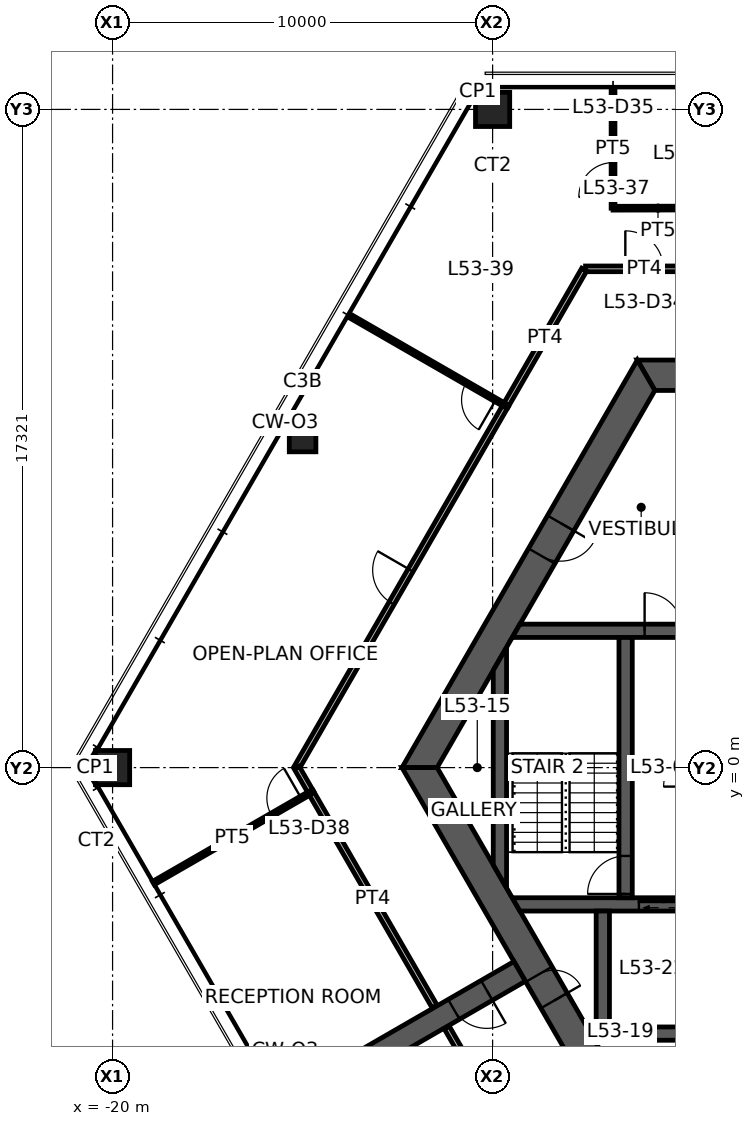
"""IFC4 building model, lengths in metres.
Left out: names, types, materials, properties, quantities, classifications, styles, units other than length and angle.
Written with IfcOpenShell. Run it as: python <this file> out.ifc"""

import sys

from ifc_helpers import new_model, si_unit, direction, frame, frame_2d, origin, origin_2d, place, context, subcontext, project, spatial, polyline, rectangle, hollow_rectangle, outline, extrude, element, fill, save


model = new_model("IFC4")
c1 = context("Model", 3, precision=1e-05, world=origin(), true_north=direction((0.0, 1.0)))
c2 = subcontext(c1, "Body", "Model", "MODEL_VIEW")
j1 = project(units=[si_unit("LENGTHUNIT", "METRE"), si_unit("PLANEANGLEUNIT", "RADIAN")], contexts=[c1])
p1 = place(None, origin())
s1 = spatial("IfcSite", under=j1, at=p1, CompositionType="ELEMENT")
p2 = place(p1, origin())
s2 = spatial("IfcBuilding", under=s1, at=p2, CompositionType="ELEMENT")
p3 = place(p2, frame((0.0, 0.0, 212.8)))
s3 = spatial("IfcBuildingStorey", under=s2, at=p3, CompositionType="ELEMENT", Elevation=212.8)
for number, where, z_axis, x_axis in (
    (1, (-10.0, 17.321, 0.0), (0.0, 0.0, 1.0), (1.0, 0.0, 0.0)),
    (2, (-20.0, 0.0, 0.0), (0.0, 0.0, 1.0), (1.0, 0.0, 0.0)),
):
    element("IfcColumn", number, at=place(p3, frame(where, z_axis=z_axis, x_axis=x_axis)), inside=s3, PredefinedType="COLUMN", context=c2, shape_type="SweptSolid", body=[
        extrude(hollow_rectangle(XDim=0.9, YDim=0.9, WallThickness=0.09, at=origin_2d()), origin(), (0.0, 0.0, 1.0), 3.9),
    ])
p4 = place(p3, frame((-15.0, 8.66, 0.0), z_axis=(0.0, 0.0, 1.0), x_axis=(1.0, 0.0, 0.0)))
e3 = element("IfcColumn", 3, at=p4, inside=s3, PredefinedType="COLUMN", context=c2, shape_type="SweptSolid", body=[
    extrude(hollow_rectangle(XDim=0.7, YDim=0.7, WallThickness=0.036, at=origin_2d()), origin(), (0.0, 0.0, 1.0), 3.9),
])
p5 = place(p3, frame((5.961, 10.325, 0.0), z_axis=(0.0, 0.0, 1.0), x_axis=(-1.0, 0.0, 0.0)))
e4 = element("IfcWall", 4, at=p5, inside=s3, PredefinedType="SHEAR", context=c2, shape_type="SweptSolid", body=[
    extrude(outline(polyline([(-0.231, -0.4), (4.649, -0.4), (5.549, -0.4), (6.374, -0.4), (7.273, -0.4), (12.153, -0.4), (11.691, 0.4), (7.273, 0.4), (6.374, 0.4), (5.549, 0.4), (4.649, 0.4), (0.231, 0.4), (-0.231, -0.4)])), origin(), (0.0, 0.0, 1.0), 3.9),
])
p6 = place(p5, frame((6.374, 0.0, 0.0)))
e5 = element("IfcOpeningElement", 5, at=p6, cuts=e4, PredefinedType="OPENING", context=c2, shape_type="SweptSolid", body=[
    extrude(rectangle(XDim=0.9, YDim=2.1, at=frame_2d((0.45, 1.05))), frame((0.0, 0.41, 0.0), z_axis=(0.0, -1.0, 0.0), x_axis=(1.0, 0.0, 0.0)), (0.0, 0.0, 1.0), 0.82),
])
p7 = place(p5, frame((4.649, 0.0, 0.0)))
e6 = element("IfcOpeningElement", 6, at=p7, cuts=e4, PredefinedType="OPENING", context=c2, shape_type="SweptSolid", body=[
    extrude(rectangle(XDim=0.9, YDim=2.1, at=frame_2d((0.45, 1.05))), frame((0.0, 0.41, 0.0), z_axis=(0.0, -1.0, 0.0), x_axis=(1.0, 0.0, 0.0)), (0.0, 0.0, 1.0), 0.82),
])
p8 = place(p3, frame((-5.961, 10.325, 0.0), z_axis=(0.0, 0.0, 1.0), x_axis=(-0.500004296715, -0.866022923061, 0.0)))
e7 = element("IfcWall", 7, at=p8, inside=s3, PredefinedType="SHEAR", context=c2, shape_type="SweptSolid", body=[
    extrude(outline(polyline([(-0.231, -0.4), (4.494, -0.4), (5.494, -0.4), (12.153, -0.4), (11.691, 0.4), (5.494, 0.4), (4.494, 0.4), (0.231, 0.4), (-0.231, -0.4)])), origin(), (0.0, 0.0, 1.0), 3.9),
])
p9 = place(p8, frame((4.494, 0.0, 0.0)))
e8 = element("IfcOpeningElement", 8, at=p9, cuts=e7, PredefinedType="OPENING", context=c2, shape_type="SweptSolid", body=[
    extrude(rectangle(XDim=1.0, YDim=2.1, at=frame_2d((0.5, 1.05))), frame((0.0, 0.41, 0.0), z_axis=(0.0, -1.0, 0.0), x_axis=(1.0, 0.0, 0.0)), (0.0, 0.0, 1.0), 0.82),
])
p10 = place(p3, frame((-11.922, 0.0, 0.0), z_axis=(0.0, 0.0, 1.0), x_axis=(0.500004296715, -0.866022923061, 0.0)))
e9 = element("IfcWall", 9, at=p10, inside=s3, PredefinedType="SHEAR", context=c2, shape_type="SweptSolid", body=[
    extrude(outline(polyline([(-0.231, -0.4), (6.281, -0.4), (7.081, -0.4), (12.153, -0.4), (11.691, 0.4), (7.081, 0.4), (6.281, 0.4), (0.231, 0.4), (-0.231, -0.4)])), origin(), (0.0, 0.0, 1.0), 3.9),
])
p11 = place(p10, frame((6.281, 0.0, 0.0)))
e10 = element("IfcOpeningElement", 10, at=p11, cuts=e9, PredefinedType="OPENING", context=c2, shape_type="SweptSolid", body=[
    extrude(rectangle(XDim=0.8, YDim=2.1, at=frame_2d((0.4, 1.05))), frame((0.0, 0.41, 0.0), z_axis=(0.0, -1.0, 0.0), x_axis=(1.0, 0.0, 0.0)), (0.0, 0.0, 1.0), 0.82),
])
p12 = place(p3, frame((-9.288, -5.363, 0.0), z_axis=(0.0, 0.0, 1.0), x_axis=(-0.866027473358, -0.499996415376, 0.0)))
e11 = element("IfcWall", 11, at=p12, inside=s3, PredefinedType="SHEAR", context=c2, shape_type="SweptSolid", body=[
    extrude(rectangle(XDim=7.045, YDim=0.6, at=frame_2d((3.523, 0.0))), origin(), (0.0, 0.0, 1.0), 3.9),
])
p13 = place(p12, frame((1.0, 0.0, 0.0)))
e12 = element("IfcOpeningElement", 12, at=p13, cuts=e11, PredefinedType="OPENING", context=c2, shape_type="SweptSolid", body=[
    extrude(rectangle(XDim=1.0, YDim=2.1, at=frame_2d((0.5, 1.05))), frame((0.0, 0.31, 0.0), z_axis=(0.0, -1.0, 0.0), x_axis=(1.0, 0.0, 0.0)), (0.0, 0.0, 1.0), 0.62),
])
p14 = place(p3, frame((-9.382, 3.6, 0.0), z_axis=(0.0, 0.0, 1.0), x_axis=(1.0, 0.0, 0.0)))
e13 = element("IfcWall", 13, at=p14, inside=s3, PredefinedType="SHEAR", context=c2, shape_type="SweptSolid", body=[
    extrude(outline(polyline([(-0.101, -0.175), (3.382, -0.175), (4.382, -0.175), (5.782, -0.175), (6.882, -0.175), (7.957, -0.175), (7.957, 0.175), (6.882, 0.175), (5.782, 0.175), (4.382, 0.175), (3.382, 0.175), (0.101, 0.175), (-0.101, -0.175)])), origin(), (0.0, 0.0, 1.0), 3.9),
])
p15 = place(p14, frame((3.382, 0.0, 0.0)))
e14 = element("IfcOpeningElement", 14, at=p15, cuts=e13, PredefinedType="OPENING", context=c2, shape_type="SweptSolid", body=[
    extrude(rectangle(XDim=1.0, YDim=2.1, at=frame_2d((0.5, 1.05))), frame((0.0, 0.185, 0.0), z_axis=(0.0, -1.0, 0.0), x_axis=(1.0, 0.0, 0.0)), (0.0, 0.0, 1.0), 0.37),
])
p16 = place(p14, frame((5.782, 0.0, 0.0)))
e15 = element("IfcOpeningElement", 15, at=p16, cuts=e13, PredefinedType="OPENING", context=c2, shape_type="SweptSolid", body=[
    extrude(rectangle(XDim=1.1, YDim=2.1, at=frame_2d((0.55, 1.05))), frame((0.0, 0.185, 0.0), z_axis=(0.0, -1.0, 0.0), x_axis=(1.0, 0.0, 0.0)), (0.0, 0.0, 1.0), 0.37),
])
p17 = place(p3, frame((-9.382, -3.6, 0.0), z_axis=(0.0, 0.0, 1.0), x_axis=(1.0, 0.0, 0.0)))
e16 = element("IfcWall", 16, at=p17, inside=s3, PredefinedType="SHEAR", context=c2, shape_type="SweptSolid", body=[
    extrude(outline(polyline([(0.101, -0.175), (3.232, -0.175), (4.532, -0.175), (5.782, -0.175), (6.882, -0.175), (7.957, -0.175), (7.957, 0.175), (6.882, 0.175), (5.782, 0.175), (4.532, 0.175), (3.232, 0.175), (-0.101, 0.175), (0.101, -0.175)])), origin(), (0.0, 0.0, 1.0), 3.9),
])
p18 = place(p17, frame((5.782, 0.0, 0.0)))
e17 = element("IfcOpeningElement", 17, at=p18, cuts=e16, PredefinedType="OPENING", context=c2, shape_type="SweptSolid", body=[
    extrude(rectangle(XDim=1.1, YDim=2.1, at=frame_2d((0.55, 1.05))), frame((0.0, 0.185, 0.0), z_axis=(0.0, -1.0, 0.0), x_axis=(1.0, 0.0, 0.0)), (0.0, 0.0, 1.0), 0.37),
])
p19 = place(p17, frame((3.232, 0.0, 0.0)))
e18 = element("IfcOpeningElement", 18, at=p19, cuts=e16, PredefinedType="OPENING", context=c2, shape_type="SweptSolid", body=[
    extrude(rectangle(XDim=1.3, YDim=2.1, at=frame_2d((0.65, 1.05))), frame((0.0, 0.185, 0.0), z_axis=(0.0, -1.0, 0.0), x_axis=(1.0, 0.0, 0.0)), (0.0, 0.0, 1.0), 0.37),
])
p20 = place(p3, frame((-6.5, -3.425, 0.0), z_axis=(0.0, 0.0, 1.0), x_axis=(0.0, 1.0, 0.0)))
e19 = element("IfcWall", 19, at=p20, inside=s3, PredefinedType="SHEAR", context=c2, shape_type="SweptSolid", body=[
    extrude(rectangle(XDim=6.85, YDim=0.35, at=frame_2d((3.425, 0.0))), origin(), (0.0, 0.0, 1.0), 3.9),
])
p21 = place(p20, frame((0.1, 0.0, 0.0)))
e20 = element("IfcOpeningElement", 20, at=p21, cuts=e19, PredefinedType="OPENING", context=c2, shape_type="SweptSolid", body=[
    extrude(rectangle(XDim=1.0, YDim=2.1, at=frame_2d((0.5, 1.05))), frame((0.0, 0.185, 0.0), z_axis=(0.0, -1.0, 0.0), x_axis=(1.0, 0.0, 0.0)), (0.0, 0.0, 1.0), 0.37),
])
p22 = place(p3, frame((-7.275, -7.0, 0.0), z_axis=(0.0, 0.0, 1.0), x_axis=(1.0, 0.0, 0.0)))
e21 = element("IfcWall", 21, at=p22, inside=s3, PredefinedType="SHEAR", context=c2, shape_type="SweptSolid", body=[
    extrude(rectangle(XDim=2.6, YDim=0.35, at=frame_2d((1.3, 0.0))), origin(), (0.0, 0.0, 1.0), 3.9),
])
p23 = place(p3, frame((-7.1, -3.775, 0.0), z_axis=(0.0, 0.0, 1.0), x_axis=(0.0, -1.0, 0.0)))
e22 = element("IfcWall", 22, at=p23, inside=s3, PredefinedType="SHEAR", context=c2, shape_type="SweptSolid", body=[
    extrude(rectangle(XDim=3.05, YDim=0.35, at=frame_2d((1.525, 0.0))), origin(), (0.0, 0.0, 1.0), 3.9),
])
p24 = place(p3, frame((-9.808, -2.862, 0.0), z_axis=(0.0, 0.0, 1.0), x_axis=(0.0, 1.0, 0.0)))
e23 = element("IfcWall", 23, at=p24, inside=s3, PredefinedType="SHEAR", context=c2, shape_type="SweptSolid", body=[
    extrude(outline(polyline([(-0.303, -0.175), (6.028, -0.175), (5.421, 0.175), (0.303, 0.175), (-0.303, -0.175)])), origin(), (0.0, 0.0, 1.0), 3.9),
])
p25 = place(p3, frame((-7.555, 13.125, 0.0), z_axis=(0.0, 0.0, 1.0), x_axis=(1.0, 0.0, 0.0)))
e24 = element("IfcWall", 24, at=p25, inside=s3, PredefinedType="PARTITIONING", context=c2, shape_type="SweptSolid", body=[
    extrude(rectangle(XDim=3.094, YDim=0.15, at=frame_2d((1.547, 0.0))), origin(), (0.0, 0.0, 1.0), 2.95),
])
p26 = place(p25, frame((1.047, 0.0, 0.0)))
e25 = element("IfcOpeningElement", 25, at=p26, cuts=e24, PredefinedType="OPENING", context=c2, shape_type="SweptSolid", body=[
    extrude(rectangle(XDim=1.0, YDim=2.1, at=frame_2d((0.5, 1.05))), frame((0.0, 0.085, 0.0), z_axis=(0.0, -1.0, 0.0), x_axis=(1.0, 0.0, 0.0)), (0.0, 0.0, 1.0), 0.17),
])
p27 = place(p3, frame((-6.831, 14.72, 0.0), z_axis=(0.0, 0.0, 1.0), x_axis=(0.0, 1.0, 0.0)))
e26 = element("IfcWall", 26, at=p27, inside=s3, PredefinedType="PARTITIONING", context=c2, shape_type="SweptSolid", body=[
    extrude(rectangle(XDim=3.135, YDim=0.1, at=frame_2d((1.567, 0.0))), origin(), (0.0, 0.0, 1.0), 2.95),
])
p28 = place(p27, frame((0.3, 0.0, 0.0)))
e27 = element("IfcOpeningElement", 27, at=p28, cuts=e26, PredefinedType="OPENING", context=c2, shape_type="SweptSolid", body=[
    extrude(rectangle(XDim=0.9, YDim=2.1, at=frame_2d((0.45, 1.05))), frame((0.0, 0.06, 0.0), z_axis=(0.0, -1.0, 0.0), x_axis=(1.0, 0.0, 0.0)), (0.0, 0.0, 1.0), 0.12),
])
p29 = place(p3, frame((-4.465, 14.725, 0.0), z_axis=(0.0, 0.0, 1.0), x_axis=(-0.999998077668, -0.001960780544, 0.0)))
e28 = element("IfcWall", 28, at=p29, inside=s3, PredefinedType="PARTITIONING", context=c2, shape_type="SweptSolid", body=[
    extrude(rectangle(XDim=2.366, YDim=0.1, at=frame_2d((1.183, 0.0))), origin(), (0.0, 0.0, 1.0), 2.95),
])
p30 = place(p3, frame((-9.661, 9.516, 0.0), z_axis=(0.0, 0.0, 1.0), x_axis=(0.499997836828, 0.866026652689, 0.0)))
e29 = element("IfcWall", 29, at=p30, inside=s3, PredefinedType="PARTITIONING", context=c2, shape_type="SweptSolid", body=[
    extrude(rectangle(XDim=4.144, YDim=0.15, at=frame_2d((2.072, 0.0))), origin(), (0.0, 0.0, 1.0), 2.95),
])
p31 = place(p3, frame((-11.527, -6.285, 0.0), z_axis=(0.0, 0.0, 1.0), x_axis=(-0.500003537243, 0.866023361547, 0.0)))
e30 = element("IfcWall", 30, at=p31, inside=s3, PredefinedType="PARTITIONING", context=c2, shape_type="SweptSolid", body=[
    extrude(rectangle(XDim=6.516, YDim=0.15, at=frame_2d((3.258, 0.0))), origin(), (0.0, 0.0, 1.0), 2.95),
])
p32 = place(p3, frame((-15.156, 0.0, 0.0), z_axis=(0.0, 0.0, 1.0), x_axis=(0.500006847747, 0.8660214502, 0.0)))
e31 = element("IfcWall", 31, at=p32, inside=s3, PredefinedType="PARTITIONING", context=c2, shape_type="SweptSolid", body=[
    extrude(rectangle(XDim=10.998, YDim=0.15, at=frame_2d((5.499, 0.0))), origin(), (0.0, 0.0, 1.0), 2.95),
])
p33 = place(p32, frame((4.999, 0.0, 0.0)))
e32 = element("IfcOpeningElement", 32, at=p33, cuts=e31, PredefinedType="OPENING", context=c2, shape_type="SweptSolid", body=[
    extrude(rectangle(XDim=1.0, YDim=2.1, at=frame_2d((0.5, 1.05))), frame((0.0, 0.085, 0.0), z_axis=(0.0, -1.0, 0.0), x_axis=(1.0, 0.0, 0.0)), (0.0, 0.0, 1.0), 0.17),
])
p34 = place(p3, frame((-14.78, -0.651, 0.0), z_axis=(0.0, 0.0, 1.0), x_axis=(-0.500088105676, 0.865974529972, 0.0)))
e33 = element("IfcWall", 33, at=p34, inside=s3, PredefinedType="PARTITIONING", context=c2, shape_type="SweptSolid", body=[
    extrude(rectangle(XDim=0.751, YDim=0.15, at=frame_2d((0.375, 0.0))), origin(), (0.0, 0.0, 1.0), 2.95),
])
p35 = place(p3, frame((-9.656, 9.524, 0.0), z_axis=(0.0, 0.0, 1.0), x_axis=(-0.866526579402, 0.499130931911, 0.0)))
e34 = element("IfcWall", 34, at=p35, inside=s3, PredefinedType="PARTITIONING", context=c2, shape_type="SweptSolid", body=[
    extrude(rectangle(XDim=4.705, YDim=0.1, at=frame_2d((2.353, 0.0))), origin(), (0.0, 0.0, 1.0), 2.95),
])
p36 = place(p35, frame((0.3, 0.0, 0.0)))
e35 = element("IfcOpeningElement", 35, at=p36, cuts=e34, PredefinedType="OPENING", context=c2, shape_type="SweptSolid", body=[
    extrude(rectangle(XDim=0.9, YDim=2.1, at=frame_2d((0.45, 1.05))), frame((0.0, 0.06, 0.0), z_axis=(0.0, -1.0, 0.0), x_axis=(1.0, 0.0, 0.0)), (0.0, 0.0, 1.0), 0.12),
])
p37 = place(p3, frame((-18.927, -3.04, 0.0), z_axis=(0.0, 0.0, 1.0), x_axis=(0.866495418212, 0.499185026035, 0.0)))
e36 = element("IfcWall", 36, at=p37, inside=s3, PredefinedType="PARTITIONING", context=c2, shape_type="SweptSolid", body=[
    extrude(rectangle(XDim=4.786, YDim=0.1, at=frame_2d((2.393, 0.0))), origin(), (0.0, 0.0, 1.0), 2.95),
])
p38 = place(p37, frame((3.585, 0.0, 0.0)))
e37 = element("IfcOpeningElement", 37, at=p38, cuts=e36, PredefinedType="OPENING", context=c2, shape_type="SweptSolid", body=[
    extrude(rectangle(XDim=0.9, YDim=2.1, at=frame_2d((0.45, 1.05))), frame((0.0, 0.06, 0.0), z_axis=(0.0, -1.0, 0.0), x_axis=(1.0, 0.0, 0.0)), (0.0, 0.0, 1.0), 0.12),
])
p39 = place(p3, frame((-7.589, -13.105, 0.0), z_axis=(0.0, 0.0, 1.0), x_axis=(-0.499986333712, 0.866033293876, 0.0)))
e38 = element("IfcWall", 38, at=p39, inside=s3, PredefinedType="PARTITIONING", context=c2, shape_type="SweptSolid", body=[
    extrude(rectangle(XDim=7.235, YDim=0.15, at=frame_2d((3.617, 0.0))), origin(), (0.0, 0.0, 1.0), 2.95),
])
p40 = place(p39, frame((3.117, 0.0, 0.0)))
e39 = element("IfcOpeningElement", 39, at=p40, cuts=e38, PredefinedType="OPENING", context=c2, shape_type="SweptSolid", body=[
    extrude(rectangle(XDim=1.0, YDim=2.1, at=frame_2d((0.5, 1.05))), frame((0.0, 0.085, 0.0), z_axis=(0.0, -1.0, 0.0), x_axis=(1.0, 0.0, 0.0)), (0.0, 0.0, 1.0), 0.17),
])
p41 = place(p11, origin())
e40 = element("IfcDoor", 40, at=p41, inside=s3, OperationType="SINGLE_SWING_RIGHT", PredefinedType="DOOR", context=c2, shape_type="SweptSolid", body=[
    extrude(rectangle(XDim=0.8, YDim=2.1, at=frame_2d((0.4, 1.05))), frame((0.0, 0.025, 0.0), z_axis=(0.0, -1.0, 0.0), x_axis=(1.0, 0.0, 0.0)), (0.0, 0.0, 1.0), 0.05),
])
fill(e10, e40)
p42 = place(p9, origin())
e41 = element("IfcDoor", 41, at=p42, inside=s3, OperationType="SINGLE_SWING_LEFT", PredefinedType="DOOR", context=c2, shape_type="SweptSolid", body=[
    extrude(rectangle(XDim=1.0, YDim=2.1, at=frame_2d((0.5, 1.05))), frame((0.0, 0.025, 0.0), z_axis=(0.0, -1.0, 0.0), x_axis=(1.0, 0.0, 0.0)), (0.0, 0.0, 1.0), 0.05),
])
fill(e8, e41)
p43 = place(p21, origin())
e42 = element("IfcDoor", 42, at=p43, inside=s3, OperationType="SINGLE_SWING_LEFT", PredefinedType="DOOR", context=c2, shape_type="SweptSolid", body=[
    extrude(rectangle(XDim=1.0, YDim=2.1, at=frame_2d((0.5, 1.05))), frame((0.0, 0.025, 0.0), z_axis=(0.0, -1.0, 0.0), x_axis=(1.0, 0.0, 0.0)), (0.0, 0.0, 1.0), 0.05),
])
fill(e20, e42)
p44 = place(p15, origin())
e43 = element("IfcDoor", 43, at=p44, inside=s3, OperationType="SINGLE_SWING_LEFT", PredefinedType="DOOR", context=c2, shape_type="SweptSolid", body=[
    extrude(rectangle(XDim=1.0, YDim=2.1, at=frame_2d((0.5, 1.05))), frame((0.0, 0.025, 0.0), z_axis=(0.0, -1.0, 0.0), x_axis=(1.0, 0.0, 0.0)), (0.0, 0.0, 1.0), 0.05),
])
fill(e14, e43)
p45 = place(p13, origin())
e44 = element("IfcDoor", 44, at=p45, inside=s3, OperationType="SINGLE_SWING_LEFT", PredefinedType="DOOR", context=c2, shape_type="SweptSolid", body=[
    extrude(rectangle(XDim=1.0, YDim=2.1, at=frame_2d((0.5, 1.05))), frame((0.0, 0.025, 0.0), z_axis=(0.0, -1.0, 0.0), x_axis=(1.0, 0.0, 0.0)), (0.0, 0.0, 1.0), 0.05),
])
fill(e12, e44)
p46 = place(p26, origin())
e45 = element("IfcDoor", 45, at=p46, inside=s3, OperationType="SINGLE_SWING_LEFT", PredefinedType="DOOR", context=c2, shape_type="SweptSolid", body=[
    extrude(rectangle(XDim=1.0, YDim=2.1, at=frame_2d((0.5, 1.05))), frame((0.0, 0.025, 0.0), z_axis=(0.0, -1.0, 0.0), x_axis=(1.0, 0.0, 0.0)), (0.0, 0.0, 1.0), 0.05),
])
fill(e25, e45)
p47 = place(p28, origin())
e46 = element("IfcDoor", 46, at=p47, inside=s3, OperationType="SINGLE_SWING_LEFT", PredefinedType="DOOR", context=c2, shape_type="SweptSolid", body=[
    extrude(rectangle(XDim=0.9, YDim=2.1, at=frame_2d((0.45, 1.05))), frame((0.0, 0.025, 0.0), z_axis=(0.0, -1.0, 0.0), x_axis=(1.0, 0.0, 0.0)), (0.0, 0.0, 1.0), 0.05),
])
fill(e27, e46)
p48 = place(p33, origin())
e47 = element("IfcDoor", 47, at=p48, inside=s3, OperationType="SINGLE_SWING_RIGHT", PredefinedType="DOOR", context=c2, shape_type="SweptSolid", body=[
    extrude(rectangle(XDim=1.0, YDim=2.1, at=frame_2d((0.5, 1.05))), frame((0.0, 0.025, 0.0), z_axis=(0.0, -1.0, 0.0), x_axis=(1.0, 0.0, 0.0)), (0.0, 0.0, 1.0), 0.05),
])
fill(e32, e47)
p49 = place(p36, origin())
e48 = element("IfcDoor", 48, at=p49, inside=s3, OperationType="SINGLE_SWING_LEFT", PredefinedType="DOOR", context=c2, shape_type="SweptSolid", body=[
    extrude(rectangle(XDim=0.9, YDim=2.1, at=frame_2d((0.45, 1.05))), frame((0.0, 0.025, 0.0), z_axis=(0.0, -1.0, 0.0), x_axis=(1.0, 0.0, 0.0)), (0.0, 0.0, 1.0), 0.05),
])
fill(e35, e48)
p50 = place(p38, origin())
e49 = element("IfcDoor", 49, at=p50, inside=s3, OperationType="SINGLE_SWING_RIGHT", PredefinedType="DOOR", context=c2, shape_type="SweptSolid", body=[
    extrude(rectangle(XDim=0.9, YDim=2.1, at=frame_2d((0.45, 1.05))), frame((0.0, 0.025, 0.0), z_axis=(0.0, -1.0, 0.0), x_axis=(1.0, 0.0, 0.0)), (0.0, 0.0, 1.0), 0.05),
])
fill(e37, e49)
p51 = place(p19, origin())
e50 = element("IfcDoor", 50, at=p51, inside=s3, OperationType="DOUBLE_DOOR_SLIDING", PredefinedType="DOOR", context=c2, shape_type="SweptSolid", body=[
    extrude(rectangle(XDim=1.3, YDim=2.1, at=frame_2d((0.65, 1.05))), frame((0.0, 0.025, 0.0), z_axis=(0.0, -1.0, 0.0), x_axis=(1.0, 0.0, 0.0)), (0.0, 0.0, 1.0), 0.05),
])
fill(e18, e50)
save(model, sys.argv[1])
